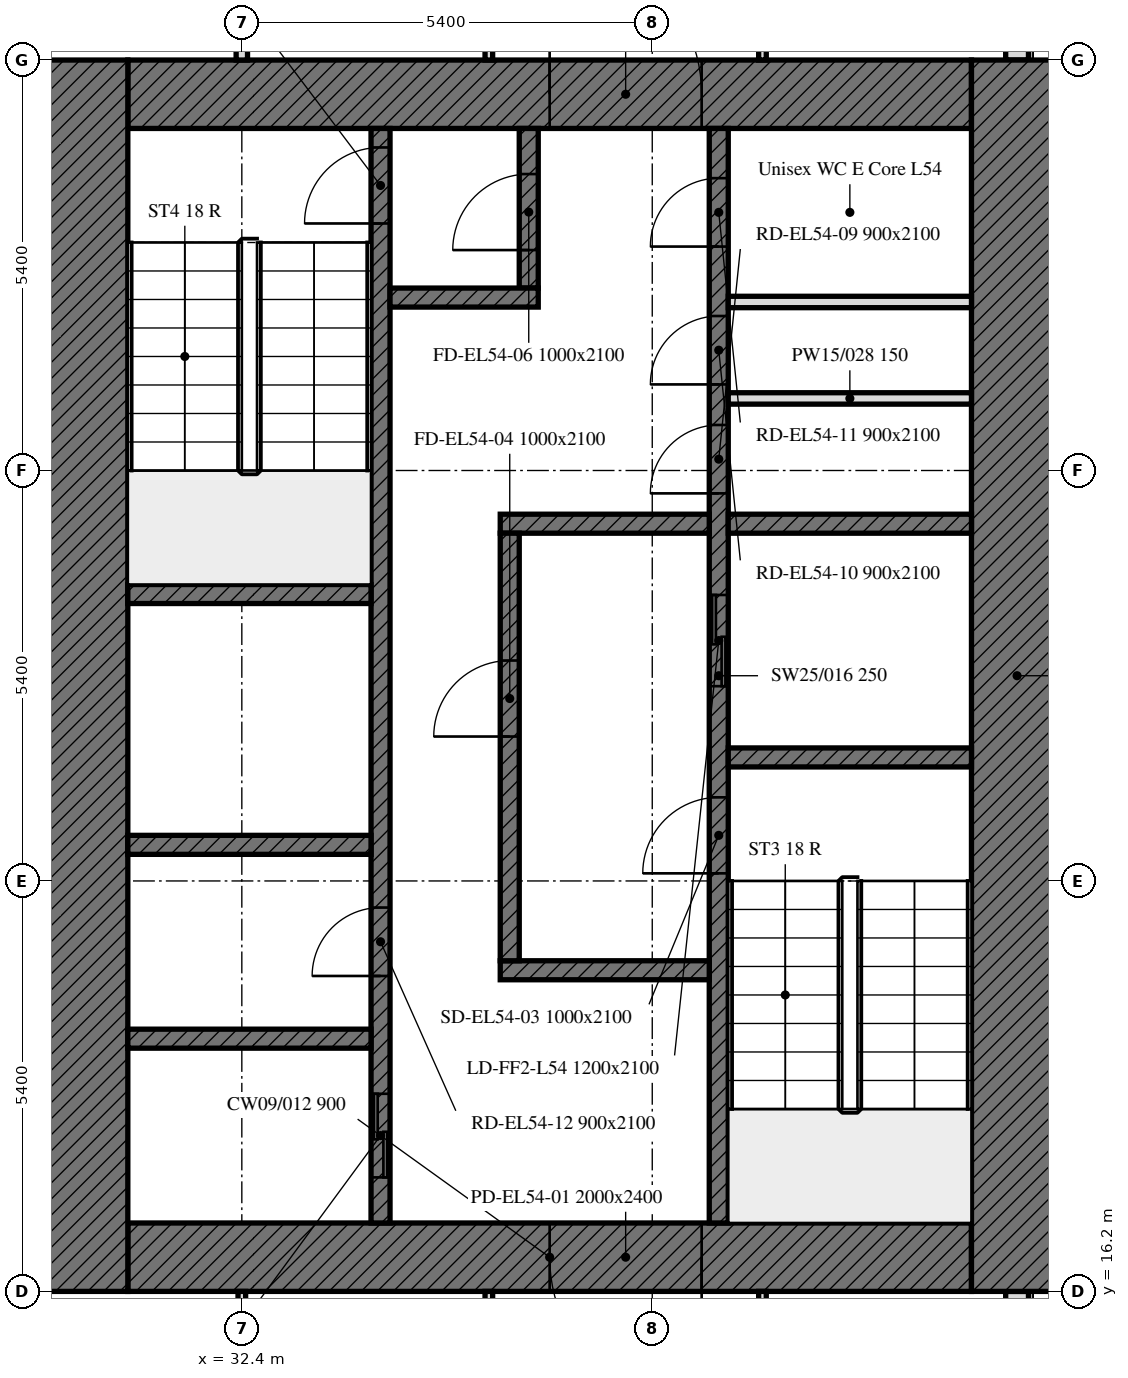
"""IFC4 building model, lengths in metres.
Left out: names, types, materials, properties, quantities, classifications, styles, units other than length and angle.
Written with IfcOpenShell. Run it as: python <this file> out.ifc"""

import sys

from ifc_helpers import new_model, si_unit, direction, frame, frame_2d, origin, place, context, subcontext, project, spatial, rectangle, extrude, element, fill, save


model = new_model("IFC4")
c1 = context("Model", 3, precision=1e-05, world=origin(), true_north=direction((0.0, 1.0)))
c2 = subcontext(c1, "Body", "Model", "MODEL_VIEW")
j1 = project(units=[si_unit("LENGTHUNIT", "METRE"), si_unit("PLANEANGLEUNIT", "RADIAN")], contexts=[c1])
p1 = place(None, origin())
s1 = spatial("IfcSite", under=j1, at=p1, CompositionType="ELEMENT")
p2 = place(p1, origin())
s2 = spatial("IfcBuilding", under=s1, at=p2, CompositionType="ELEMENT")
p3 = place(p2, frame((0.0, 0.0, 217.0)))
s3 = spatial("IfcBuildingStorey", under=s2, at=p3, CompositionType="ELEMENT", Elevation=217.0)
p4 = place(p3, frame((42.6, 10.986, 0.0), z_axis=(0.0, 0.0, 1.0), x_axis=(0.0, 1.0, 0.0)))
e1 = element("IfcWall", 1, at=p4, inside=s3, PredefinedType="SOLIDWALL", context=c2, shape_type="SweptSolid", body=[
    extrude(rectangle(XDim=5.214, YDim=0.3, at=frame_2d((2.607, 0.0))), origin(), (0.0, 0.0, 1.0), 3.0),
])
p5 = place(p4, frame((1.239, 0.0, 0.9)))
e2 = element("IfcOpeningElement", 2, at=p5, cuts=e1, PredefinedType="OPENING", context=c2, shape_type="SweptSolid", body=[
    extrude(rectangle(XDim=0.65, YDim=1.7, at=frame_2d((0.325, 0.85))), frame((0.0, 0.16, 0.0), z_axis=(0.0, -1.0, 0.0), x_axis=(1.0, 0.0, 0.0)), (0.0, 0.0, 1.0), 0.32),
])
p6 = place(p4, frame((2.764, 0.0, 0.9)))
e3 = element("IfcOpeningElement", 3, at=p6, cuts=e1, PredefinedType="OPENING", context=c2, shape_type="SweptSolid", body=[
    extrude(rectangle(XDim=1.1, YDim=1.7, at=frame_2d((0.55, 0.85))), frame((0.0, 0.16, 0.0), z_axis=(0.0, -1.0, 0.0), x_axis=(1.0, 0.0, 0.0)), (0.0, 0.0, 1.0), 0.32),
])
p7 = place(p3, frame((42.6, 32.4, 0.0), z_axis=(0.0, 0.0, 1.0), x_axis=(0.0, 1.0, 0.0)))
e4 = element("IfcWall", 4, at=p7, inside=s3, PredefinedType="SOLIDWALL", context=c2, shape_type="SweptSolid", body=[
    extrude(rectangle(XDim=10.614, YDim=0.3, at=frame_2d((5.307, 0.0))), origin(), (0.0, 0.0, 1.0), 3.0),
])
p8 = place(p7, frame((1.35, 0.0, 0.9)))
e5 = element("IfcOpeningElement", 5, at=p8, cuts=e4, PredefinedType="OPENING", context=c2, shape_type="SweptSolid", body=[
    extrude(rectangle(XDim=1.1, YDim=1.7, at=frame_2d((0.55, 0.85))), frame((0.0, 0.16, 0.0), z_axis=(0.0, -1.0, 0.0), x_axis=(1.0, 0.0, 0.0)), (0.0, 0.0, 1.0), 0.32),
])
p9 = place(p7, frame((2.95, 0.0, 0.9)))
e6 = element("IfcOpeningElement", 6, at=p9, cuts=e4, PredefinedType="OPENING", context=c2, shape_type="SweptSolid", body=[
    extrude(rectangle(XDim=1.1, YDim=1.7, at=frame_2d((0.55, 0.85))), frame((0.0, 0.16, 0.0), z_axis=(0.0, -1.0, 0.0), x_axis=(1.0, 0.0, 0.0)), (0.0, 0.0, 1.0), 0.32),
])
p10 = place(p7, frame((7.375, 0.0, 0.9)))
e7 = element("IfcOpeningElement", 7, at=p10, cuts=e4, PredefinedType="OPENING", context=c2, shape_type="SweptSolid", body=[
    extrude(rectangle(XDim=0.65, YDim=1.7, at=frame_2d((0.325, 0.85))), frame((0.0, 0.16, 0.0), z_axis=(0.0, -1.0, 0.0), x_axis=(1.0, 0.0, 0.0)), (0.0, 0.0, 1.0), 0.32),
])
p11 = place(p7, frame((8.175, 0.0, 0.9)))
e8 = element("IfcOpeningElement", 8, at=p11, cuts=e4, PredefinedType="OPENING", context=c2, shape_type="SweptSolid", body=[
    extrude(rectangle(XDim=0.65, YDim=1.7, at=frame_2d((0.325, 0.85))), frame((0.0, 0.16, 0.0), z_axis=(0.0, -1.0, 0.0), x_axis=(1.0, 0.0, 0.0)), (0.0, 0.0, 1.0), 0.32),
])
p12 = place(p3, frame((42.0, 16.65, 0.0), z_axis=(0.0, 0.0, 1.0), x_axis=(-1.0, 0.0, 0.0)))
e9 = element("IfcWall", 9, at=p12, inside=s3, PredefinedType="SOLIDWALL", context=c2, shape_type="SweptSolid", body=[
    extrude(rectangle(XDim=11.1, YDim=0.9, at=frame_2d((5.55, 0.0))), origin(), (0.0, 0.0, 1.0), 3.0),
])
p13 = place(p12, frame((3.55, 0.0, 0.0)))
e10 = element("IfcOpeningElement", 10, at=p13, cuts=e9, PredefinedType="OPENING", context=c2, shape_type="SweptSolid", body=[
    extrude(rectangle(XDim=2.0, YDim=2.4, at=frame_2d((1.0, 1.2))), frame((0.0, 0.45, 0.0), z_axis=(0.0, -1.0, 0.0), x_axis=(1.0, 0.0, 0.0)), (0.0, 0.0, 1.0), 0.9),
])
p14 = place(p3, frame((30.9, 31.95, 0.0), z_axis=(0.0, 0.0, 1.0), x_axis=(1.0, 0.0, 0.0)))
e11 = element("IfcWall", 11, at=p14, inside=s3, PredefinedType="SOLIDWALL", context=c2, shape_type="SweptSolid", body=[
    extrude(rectangle(XDim=11.1, YDim=0.9, at=frame_2d((5.55, 0.0))), origin(), (0.0, 0.0, 1.0), 3.0),
])
p15 = place(p14, frame((5.55, 0.0, 0.0)))
e12 = element("IfcOpeningElement", 12, at=p15, cuts=e11, PredefinedType="OPENING", context=c2, shape_type="SweptSolid", body=[
    extrude(rectangle(XDim=2.0, YDim=2.4, at=frame_2d((1.0, 1.2))), frame((0.0, 0.45, 0.0), z_axis=(0.0, -1.0, 0.0), x_axis=(1.0, 0.0, 0.0)), (0.0, 0.0, 1.0), 0.9),
])
for number, where, z_axis, x_axis in (
    (13, (42.6, 32.4, 0.0), (0.0, 0.0, 1.0), (0.0, -1.0, 0.0)),
    (14, (30.3, 16.2, 0.0), (0.0, 0.0, 1.0), (0.0, 1.0, 0.0)),
):
    element("IfcWall", number, at=place(p3, frame(where, z_axis=z_axis, x_axis=x_axis)), inside=s3, PredefinedType="SOLIDWALL", context=c2, shape_type="SweptSolid", body=[
        extrude(rectangle(XDim=16.2, YDim=1.2, at=frame_2d((8.1, 0.0))), origin(), (0.0, 0.0, 1.0), 3.0),
    ])
p16 = place(p3, frame((38.675, 17.1, 0.0), z_axis=(0.0, 0.0, 1.0), x_axis=(0.0, 1.0, 0.0)))
e15 = element("IfcWall", 15, at=p16, inside=s3, PredefinedType="SOLIDWALL", context=c2, shape_type="SweptSolid", body=[
    extrude(rectangle(XDim=14.4, YDim=0.25, at=frame_2d((7.2, 0.0))), origin(), (0.0, 0.0, 1.0), 3.0),
])
p17 = place(p16, frame((4.6, 0.0, 0.0)))
e16 = element("IfcOpeningElement", 16, at=p17, cuts=e15, PredefinedType="OPENING", context=c2, shape_type="SweptSolid", body=[
    extrude(rectangle(XDim=1.0, YDim=2.1, at=frame_2d((0.5, 1.05))), frame((0.0, 0.125, 0.0), z_axis=(0.0, -1.0, 0.0), x_axis=(1.0, 0.0, 0.0)), (0.0, 0.0, 1.0), 0.25),
])
p18 = place(p16, frame((7.062, 0.0, 0.0)))
e17 = element("IfcOpeningElement", 17, at=p18, cuts=e15, PredefinedType="OPENING", context=c2, shape_type="SweptSolid", body=[
    extrude(rectangle(XDim=1.2, YDim=2.1, at=frame_2d((0.6, 1.05))), frame((0.0, 0.125, 0.0), z_axis=(0.0, -1.0, 0.0), x_axis=(1.0, 0.0, 0.0)), (0.0, 0.0, 1.0), 0.25),
])
p19 = place(p16, frame((9.599, 0.0, 0.0)))
e18 = element("IfcOpeningElement", 18, at=p19, cuts=e15, PredefinedType="OPENING", context=c2, shape_type="SweptSolid", body=[
    extrude(rectangle(XDim=0.9, YDim=2.1, at=frame_2d((0.45, 1.05))), frame((0.0, 0.125, 0.0), z_axis=(0.0, -1.0, 0.0), x_axis=(1.0, 0.0, 0.0)), (0.0, 0.0, 1.0), 0.25),
])
p20 = place(p16, frame((11.032, 0.0, 0.0)))
e19 = element("IfcOpeningElement", 19, at=p20, cuts=e15, PredefinedType="OPENING", context=c2, shape_type="SweptSolid", body=[
    extrude(rectangle(XDim=0.9, YDim=2.1, at=frame_2d((0.45, 1.05))), frame((0.0, 0.125, 0.0), z_axis=(0.0, -1.0, 0.0), x_axis=(1.0, 0.0, 0.0)), (0.0, 0.0, 1.0), 0.25),
])
p21 = place(p16, frame((12.846, 0.0, 0.0)))
e20 = element("IfcOpeningElement", 20, at=p21, cuts=e15, PredefinedType="OPENING", context=c2, shape_type="SweptSolid", body=[
    extrude(rectangle(XDim=0.9, YDim=2.1, at=frame_2d((0.45, 1.05))), frame((0.0, 0.125, 0.0), z_axis=(0.0, -1.0, 0.0), x_axis=(1.0, 0.0, 0.0)), (0.0, 0.0, 1.0), 0.25),
])
p22 = place(p3, frame((34.225, 17.1, 0.0), z_axis=(0.0, 0.0, 1.0), x_axis=(0.0, 1.0, 0.0)))
e21 = element("IfcWall", 21, at=p22, inside=s3, PredefinedType="SOLIDWALL", context=c2, shape_type="SweptSolid", body=[
    extrude(rectangle(XDim=14.4, YDim=0.25, at=frame_2d((7.2, 0.0))), origin(), (0.0, 0.0, 1.0), 3.0),
])
p23 = place(p22, frame((13.15, 0.0, 0.0)))
e22 = element("IfcOpeningElement", 22, at=p23, cuts=e21, PredefinedType="OPENING", context=c2, shape_type="SweptSolid", body=[
    extrude(rectangle(XDim=1.0, YDim=2.1, at=frame_2d((0.5, 1.05))), frame((0.0, 0.125, 0.0), z_axis=(0.0, -1.0, 0.0), x_axis=(1.0, 0.0, 0.0)), (0.0, 0.0, 1.0), 0.25),
])
p24 = place(p22, frame((0.6, 0.0, 0.0)))
e23 = element("IfcOpeningElement", 23, at=p24, cuts=e21, PredefinedType="OPENING", context=c2, shape_type="SweptSolid", body=[
    extrude(rectangle(XDim=1.1, YDim=2.1, at=frame_2d((0.55, 1.05))), frame((0.0, 0.125, 0.0), z_axis=(0.0, -1.0, 0.0), x_axis=(1.0, 0.0, 0.0)), (0.0, 0.0, 1.0), 0.25),
])
p25 = place(p22, frame((3.25, 0.0, 0.0)))
e24 = element("IfcOpeningElement", 24, at=p25, cuts=e21, PredefinedType="OPENING", context=c2, shape_type="SweptSolid", body=[
    extrude(rectangle(XDim=0.9, YDim=2.1, at=frame_2d((0.45, 1.05))), frame((0.0, 0.125, 0.0), z_axis=(0.0, -1.0, 0.0), x_axis=(1.0, 0.0, 0.0)), (0.0, 0.0, 1.0), 0.25),
])
p26 = place(p3, frame((38.8, 23.225, 0.0), z_axis=(0.0, 0.0, 1.0), x_axis=(1.0, 0.0, 0.0)))
e25 = element("IfcWall", 25, at=p26, inside=s3, PredefinedType="SOLIDWALL", context=c2, shape_type="SweptSolid", body=[
    extrude(rectangle(XDim=3.2, YDim=0.25, at=frame_2d((1.6, 0.0))), origin(), (0.0, 0.0, 1.0), 3.0),
])
for number, where, z_axis, x_axis in (
    (26, (30.9, 25.375, 0.0), (0.0, 0.0, 1.0), (1.0, 0.0, 0.0)),
    (27, (30.9, 22.075, 0.0), (0.0, 0.0, 1.0), (1.0, 0.0, 0.0)),
):
    element("IfcWall", number, at=place(p3, frame(where, z_axis=z_axis, x_axis=x_axis)), inside=s3, PredefinedType="SOLIDWALL", context=c2, shape_type="SweptSolid", body=[
        extrude(rectangle(XDim=3.2, YDim=0.25, at=frame_2d((1.6, 0.0))), origin(), (0.0, 0.0, 1.0), 3.0),
    ])
p27 = place(p3, frame((38.8, 26.3, 0.0), z_axis=(0.0, 0.0, 1.0), x_axis=(1.0, 0.0, 0.0)))
e28 = element("IfcWall", 28, at=p27, inside=s3, PredefinedType="SOLIDWALL", context=c2, shape_type="SweptSolid", body=[
    extrude(rectangle(XDim=3.2, YDim=0.25, at=frame_2d((1.6, 0.0))), origin(), (0.0, 0.0, 1.0), 3.0),
])
for number, where, z_axis, x_axis in (
    (29, (35.8, 26.3, 0.0), (0.0, 0.0, 1.0), (1.0, 0.0, 0.0)),
    (30, (35.8, 20.425, 0.0), (0.0, 0.0, 1.0), (1.0, 0.0, 0.0)),
):
    element("IfcWall", number, at=place(p3, frame(where, z_axis=z_axis, x_axis=x_axis)), inside=s3, PredefinedType="SOLIDWALL", context=c2, shape_type="SweptSolid", body=[
        extrude(rectangle(XDim=2.75, YDim=0.25, at=frame_2d((1.375, 0.0))), origin(), (0.0, 0.0, 1.0), 3.0),
    ])
p28 = place(p3, frame((36.175, 29.4, 0.0), z_axis=(0.0, 0.0, 1.0), x_axis=(0.0, 1.0, 0.0)))
e31 = element("IfcWall", 31, at=p28, inside=s3, PredefinedType="SOLIDWALL", context=c2, shape_type="SweptSolid", body=[
    extrude(rectangle(XDim=2.1, YDim=0.25, at=frame_2d((1.05, 0.0))), origin(), (0.0, 0.0, 1.0), 3.0),
])
p29 = place(p28, frame((0.5, 0.0, 0.0)))
e32 = element("IfcOpeningElement", 32, at=p29, cuts=e31, PredefinedType="OPENING", context=c2, shape_type="SweptSolid", body=[
    extrude(rectangle(XDim=1.0, YDim=2.1, at=frame_2d((0.5, 1.05))), frame((0.0, 0.125, 0.0), z_axis=(0.0, -1.0, 0.0), x_axis=(1.0, 0.0, 0.0)), (0.0, 0.0, 1.0), 0.25),
])
p30 = place(p3, frame((34.35, 29.275, 0.0), z_axis=(0.0, 0.0, 1.0), x_axis=(1.0, 0.0, 0.0)))
e33 = element("IfcWall", 33, at=p30, inside=s3, PredefinedType="SOLIDWALL", context=c2, shape_type="SweptSolid", body=[
    extrude(rectangle(XDim=1.95, YDim=0.25, at=frame_2d((0.975, 0.0))), origin(), (0.0, 0.0, 1.0), 3.0),
])
p31 = place(p3, frame((35.925, 20.55, 0.0), z_axis=(0.0, 0.0, 1.0), x_axis=(0.0, 1.0, 0.0)))
e34 = element("IfcWall", 34, at=p31, inside=s3, PredefinedType="SOLIDWALL", context=c2, shape_type="SweptSolid", body=[
    extrude(rectangle(XDim=5.625, YDim=0.25, at=frame_2d((2.812, 0.0))), origin(), (0.0, 0.0, 1.0), 3.0),
])
p32 = place(p31, frame((2.95, 0.0, 0.0)))
e35 = element("IfcOpeningElement", 35, at=p32, cuts=e34, PredefinedType="OPENING", context=c2, shape_type="SweptSolid", body=[
    extrude(rectangle(XDim=1.0, YDim=2.1, at=frame_2d((0.5, 1.05))), frame((0.0, 0.125, 0.0), z_axis=(0.0, -1.0, 0.0), x_axis=(1.0, 0.0, 0.0)), (0.0, 0.0, 1.0), 0.25),
])
p33 = place(p3, frame((30.9, 19.525, 0.0), z_axis=(0.0, 0.0, 1.0), x_axis=(1.0, 0.0, 0.0)))
e36 = element("IfcWall", 36, at=p33, inside=s3, PredefinedType="SOLIDWALL", context=c2, shape_type="SweptSolid", body=[
    extrude(rectangle(XDim=3.2, YDim=0.25, at=frame_2d((1.6, 0.0))), origin(), (0.0, 0.0, 1.0), 3.0),
])
for number, where, z_axis, x_axis in (
    (37, (38.8, 27.948, 0.0), (0.0, 0.0, 1.0), (1.0, 0.0, 0.0)),
    (38, (38.8, 29.217, 0.0), (0.0, 0.0, 1.0), (1.0, 0.0, 0.0)),
):
    element("IfcWall", number, at=place(p3, frame(where, z_axis=z_axis, x_axis=x_axis)), inside=s3, PredefinedType="PARTITIONING", context=c2, shape_type="SweptSolid", body=[
        extrude(rectangle(XDim=3.2, YDim=0.15, at=frame_2d((1.6, 0.0))), origin(), (0.0, 0.0, 1.0), 3.0),
    ])
p34 = place(p3, frame((32.4, 32.4, 0.0), z_axis=(0.0, 0.0, 1.0), x_axis=(0.0, 1.0, 0.0)))
e39 = element("IfcWall", 39, at=p34, inside=s3, PredefinedType="PARTITIONING", context=c2, shape_type="SweptSolid", body=[
    extrude(rectangle(XDim=5.005, YDim=0.15, at=frame_2d((2.502, 0.0))), origin(), (0.0, 0.0, 1.0), 2.4),
])
for number, where, z_axis, x_axis in (
    (40, (39.25, 32.4, 0.0), (0.0, 0.0, 1.0), (0.0, 1.0, 0.0)),
    (41, (35.65, 39.525, 0.0), (0.0, 0.0, 1.0), (0.0, -1.0, 0.0)),
):
    element("IfcWall", number, at=place(p3, frame(where, z_axis=z_axis, x_axis=x_axis)), inside=s3, PredefinedType="PARTITIONING", context=c2, shape_type="SweptSolid", body=[
        extrude(rectangle(XDim=7.125, YDim=0.1, at=frame_2d((3.562, 0.0))), origin(), (0.0, 0.0, 1.0), 3.0),
    ])
for number, where, z_axis, x_axis in (
    (42, (32.4, 13.125, 0.0), (0.0, 0.0, 1.0), (0.0, 1.0, 0.0)),
    (43, (39.25, 13.125, 0.0), (0.0, 0.0, 1.0), (0.0, 1.0, 0.0)),
    (44, (35.65, 16.2, 0.0), (0.0, 0.0, 1.0), (0.0, -1.0, 0.0)),
):
    element("IfcWall", number, at=place(p3, frame(where, z_axis=z_axis, x_axis=x_axis)), inside=s3, PredefinedType="PARTITIONING", context=c2, shape_type="SweptSolid", body=[
        extrude(rectangle(XDim=3.075, YDim=0.1, at=frame_2d((1.538, 0.0))), origin(), (0.0, 0.0, 1.0), 3.0),
    ])
p35 = place(p13, origin())
e45 = element("IfcDoor", 45, at=p35, inside=s3, OperationType="DOUBLE_DOOR_SINGLE_SWING", PredefinedType="DOOR", context=c2, shape_type="SweptSolid", body=[
    extrude(rectangle(XDim=2.0, YDim=2.4, at=frame_2d((1.0, 1.2))), frame((0.0, 0.025, 0.0), z_axis=(0.0, -1.0, 0.0), x_axis=(1.0, 0.0, 0.0)), (0.0, 0.0, 1.0), 0.05),
])
fill(e10, e45)
p36 = place(p15, origin())
e46 = element("IfcDoor", 46, at=p36, inside=s3, OperationType="DOUBLE_DOOR_SINGLE_SWING", PredefinedType="DOOR", context=c2, shape_type="SweptSolid", body=[
    extrude(rectangle(XDim=2.0, YDim=2.4, at=frame_2d((1.0, 1.2))), frame((0.0, 0.025, 0.0), z_axis=(0.0, -1.0, 0.0), x_axis=(1.0, 0.0, 0.0)), (0.0, 0.0, 1.0), 0.05),
])
fill(e12, e46)
p37 = place(p17, origin())
e47 = element("IfcDoor", 47, at=p37, inside=s3, OperationType="SINGLE_SWING_LEFT", PredefinedType="DOOR", context=c2, shape_type="SweptSolid", body=[
    extrude(rectangle(XDim=1.0, YDim=2.1, at=frame_2d((0.5, 1.05))), frame((0.0, 0.025, 0.0), z_axis=(0.0, -1.0, 0.0), x_axis=(1.0, 0.0, 0.0)), (0.0, 0.0, 1.0), 0.05),
])
fill(e16, e47)
p38 = place(p32, origin())
e48 = element("IfcDoor", 48, at=p38, inside=s3, OperationType="SINGLE_SWING_LEFT", PredefinedType="DOOR", context=c2, shape_type="SweptSolid", body=[
    extrude(rectangle(XDim=1.0, YDim=2.1, at=frame_2d((0.5, 1.05))), frame((0.0, 0.025, 0.0), z_axis=(0.0, -1.0, 0.0), x_axis=(1.0, 0.0, 0.0)), (0.0, 0.0, 1.0), 0.05),
])
fill(e35, e48)
p39 = place(p23, origin())
e49 = element("IfcDoor", 49, at=p39, inside=s3, OperationType="SINGLE_SWING_LEFT", PredefinedType="DOOR", context=c2, shape_type="SweptSolid", body=[
    extrude(rectangle(XDim=1.0, YDim=2.1, at=frame_2d((0.5, 1.05))), frame((0.0, 0.025, 0.0), z_axis=(0.0, -1.0, 0.0), x_axis=(1.0, 0.0, 0.0)), (0.0, 0.0, 1.0), 0.05),
])
fill(e22, e49)
p40 = place(p29, origin())
e50 = element("IfcDoor", 50, at=p40, inside=s3, OperationType="SINGLE_SWING_LEFT", PredefinedType="DOOR", context=c2, shape_type="SweptSolid", body=[
    extrude(rectangle(XDim=1.0, YDim=2.1, at=frame_2d((0.5, 1.05))), frame((0.0, 0.025, 0.0), z_axis=(0.0, -1.0, 0.0), x_axis=(1.0, 0.0, 0.0)), (0.0, 0.0, 1.0), 0.05),
])
fill(e32, e50)
p41 = place(p18, origin())
e51 = element("IfcDoor", 51, at=p41, inside=s3, OperationType="DOUBLE_DOOR_SLIDING", PredefinedType="DOOR", context=c2, shape_type="SweptSolid", body=[
    extrude(rectangle(XDim=1.2, YDim=2.1, at=frame_2d((0.6, 1.05))), frame((0.0, 0.025, 0.0), z_axis=(0.0, -1.0, 0.0), x_axis=(1.0, 0.0, 0.0)), (0.0, 0.0, 1.0), 0.05),
])
fill(e17, e51)
p42 = place(p24, origin())
e52 = element("IfcDoor", 52, at=p42, inside=s3, OperationType="DOUBLE_DOOR_SLIDING", PredefinedType="DOOR", context=c2, shape_type="SweptSolid", body=[
    extrude(rectangle(XDim=1.1, YDim=2.1, at=frame_2d((0.55, 1.05))), frame((0.0, 0.025, 0.0), z_axis=(0.0, -1.0, 0.0), x_axis=(1.0, 0.0, 0.0)), (0.0, 0.0, 1.0), 0.05),
])
fill(e23, e52)
p43 = place(p19, origin())
e53 = element("IfcDoor", 53, at=p43, inside=s3, OperationType="SINGLE_SWING_LEFT", PredefinedType="DOOR", context=c2, shape_type="SweptSolid", body=[
    extrude(rectangle(XDim=0.9, YDim=2.1, at=frame_2d((0.45, 1.05))), frame((0.0, 0.025, 0.0), z_axis=(0.0, -1.0, 0.0), x_axis=(1.0, 0.0, 0.0)), (0.0, 0.0, 1.0), 0.05),
])
fill(e18, e53)
p44 = place(p20, origin())
e54 = element("IfcDoor", 54, at=p44, inside=s3, OperationType="SINGLE_SWING_LEFT", PredefinedType="DOOR", context=c2, shape_type="SweptSolid", body=[
    extrude(rectangle(XDim=0.9, YDim=2.1, at=frame_2d((0.45, 1.05))), frame((0.0, 0.025, 0.0), z_axis=(0.0, -1.0, 0.0), x_axis=(1.0, 0.0, 0.0)), (0.0, 0.0, 1.0), 0.05),
])
fill(e19, e54)
p45 = place(p21, origin())
e55 = element("IfcDoor", 55, at=p45, inside=s3, OperationType="SINGLE_SWING_LEFT", PredefinedType="DOOR", context=c2, shape_type="SweptSolid", body=[
    extrude(rectangle(XDim=0.9, YDim=2.1, at=frame_2d((0.45, 1.05))), frame((0.0, 0.025, 0.0), z_axis=(0.0, -1.0, 0.0), x_axis=(1.0, 0.0, 0.0)), (0.0, 0.0, 1.0), 0.05),
])
fill(e20, e55)
p46 = place(p25, origin())
e56 = element("IfcDoor", 56, at=p46, inside=s3, OperationType="SINGLE_SWING_LEFT", PredefinedType="DOOR", context=c2, shape_type="SweptSolid", body=[
    extrude(rectangle(XDim=0.9, YDim=2.1, at=frame_2d((0.45, 1.05))), frame((0.0, 0.025, 0.0), z_axis=(0.0, -1.0, 0.0), x_axis=(1.0, 0.0, 0.0)), (0.0, 0.0, 1.0), 0.05),
])
fill(e24, e56)
save(model, sys.argv[1])
